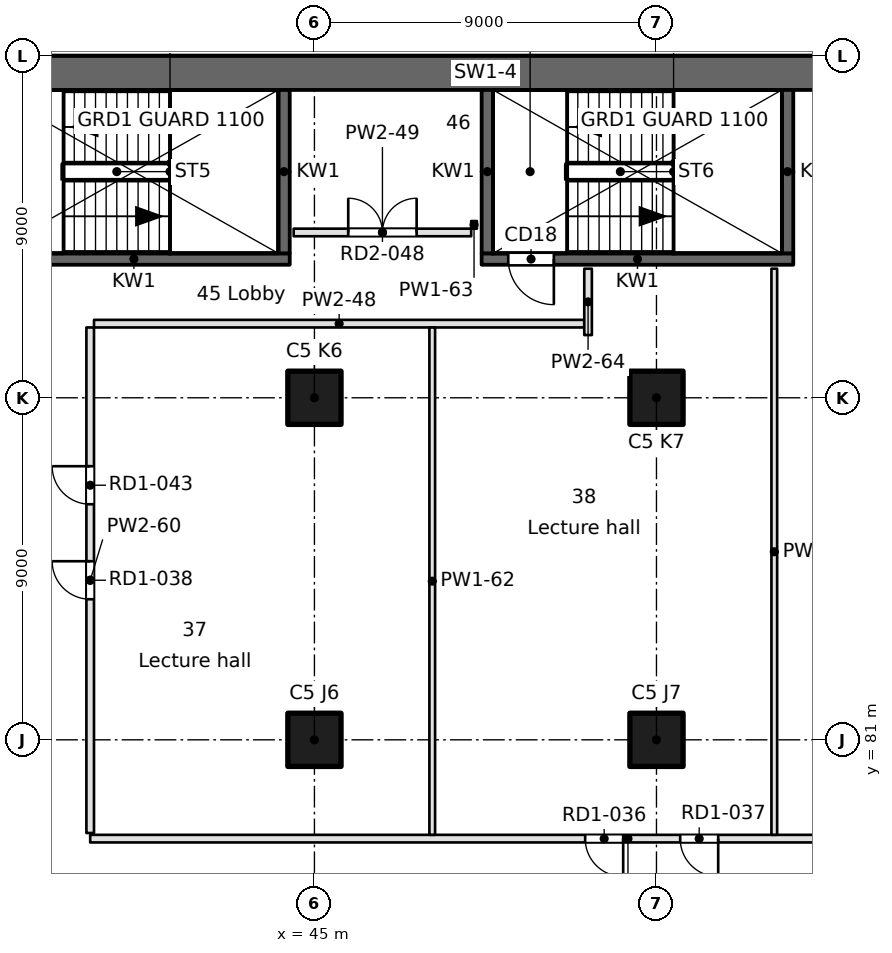
"""IFC4 building model, lengths in metres.
Left out: names, types, materials, properties, quantities, classifications, styles, units other than length and angle.
Written with IfcOpenShell. Run it as: python <this file> out.ifc"""

import sys

from ifc_helpers import new_model, si_unit, direction, frame, frame_2d, origin, origin_2d, place, context, subcontext, project, spatial, rectangle, extrude, element, fill, save


model = new_model("IFC4")
c1 = context("Model", 3, precision=1e-05, world=origin(), true_north=direction((0.0, 1.0)))
c2 = subcontext(c1, "Body", "Model", "MODEL_VIEW")
j1 = project(units=[si_unit("LENGTHUNIT", "METRE"), si_unit("PLANEANGLEUNIT", "RADIAN")], contexts=[c1])
p1 = place(None, origin())
s1 = spatial("IfcSite", under=j1, at=p1, CompositionType="ELEMENT")
p2 = place(p1, origin())
s2 = spatial("IfcBuilding", under=s1, at=p2, CompositionType="ELEMENT")
p3 = place(p2, frame((0.0, 0.0, 65.4)))
s3 = spatial("IfcBuildingStorey", under=s2, at=p3, CompositionType="ELEMENT", Elevation=65.4)
for number, where, z_axis, x_axis in (
    (1, (45.0, 81.0, 0.0), (0.0, 0.0, 1.0), (1.0, 0.0, 0.0)),
    (2, (45.0, 90.0, 0.0), (0.0, 0.0, 1.0), (1.0, 0.0, 0.0)),
    (3, (54.0, 81.0, 0.0), (0.0, 0.0, 1.0), (1.0, 0.0, 0.0)),
    (4, (54.0, 90.0, 0.0), (0.0, 0.0, 1.0), (1.0, 0.0, 0.0)),
):
    element("IfcColumn", number, at=place(p3, frame(where, z_axis=z_axis, x_axis=x_axis)), inside=s3, PredefinedType="COLUMN", context=c2, shape_type="SweptSolid", body=[
        extrude(rectangle(XDim=1.4, YDim=1.4, at=origin_2d()), origin(), (0.0, 0.0, 1.0), 3.7),
    ])
p4 = place(p3, frame((94.5, 98.55, 0.0), z_axis=(0.0, 0.0, 1.0), x_axis=(-1.0, 0.0, 0.0)))
e5 = element("IfcWall", 5, at=p4, inside=s3, PredefinedType="SHEAR", context=c2, shape_type="SweptSolid", body=[
    extrude(rectangle(XDim=90.0, YDim=0.9, at=frame_2d((45.0, 0.0))), origin(), (0.0, 0.0, 1.0), 3.7),
])
p5 = place(p3, frame((36.15, 93.65, -0.4), z_axis=(0.0, 0.0, 1.0), x_axis=(1.0, 0.0, 0.0)))
e6 = element("IfcWall", 6, at=p5, inside=s3, PredefinedType="SOLIDWALL", context=c2, shape_type="SweptSolid", body=[
    extrude(rectangle(XDim=8.2, YDim=0.3, at=frame_2d((4.1, 0.0))), origin(), (0.0, 0.0, 1.0), 3.7),
])
p6 = place(p5, frame((0.7, 0.0, 0.4)))
e7 = element("IfcOpeningElement", 7, at=p6, cuts=e6, PredefinedType="OPENING", context=c2, shape_type="SweptSolid", body=[
    extrude(rectangle(XDim=1.2, YDim=2.1, at=frame_2d((0.6, 1.05))), frame((0.0, 0.15, 0.0), z_axis=(0.0, -1.0, 0.0), x_axis=(1.0, 0.0, 0.0)), (0.0, 0.0, 1.0), 0.3),
])
p7 = place(p3, frame((49.4, 93.65, -0.4), z_axis=(0.0, 0.0, 1.0), x_axis=(1.0, 0.0, 0.0)))
e8 = element("IfcWall", 8, at=p7, inside=s3, PredefinedType="SOLIDWALL", context=c2, shape_type="SweptSolid", body=[
    extrude(rectangle(XDim=8.2, YDim=0.3, at=frame_2d((4.1, 0.0))), origin(), (0.0, 0.0, 1.0), 3.7),
])
p8 = place(p7, frame((0.7, 0.0, 0.4)))
e9 = element("IfcOpeningElement", 9, at=p8, cuts=e8, PredefinedType="OPENING", context=c2, shape_type="SweptSolid", body=[
    extrude(rectangle(XDim=1.2, YDim=2.1, at=frame_2d((0.6, 1.05))), frame((0.0, 0.15, 0.0), z_axis=(0.0, -1.0, 0.0), x_axis=(1.0, 0.0, 0.0)), (0.0, 0.0, 1.0), 0.3),
])
for number, where, z_axis, x_axis in (
    (10, (44.2, 93.8, -0.4), (0.0, 0.0, 1.0), (0.0, 1.0, 0.0)),
    (11, (49.55, 93.8, -0.4), (0.0, 0.0, 1.0), (0.0, 1.0, 0.0)),
    (12, (57.45, 93.8, -0.4), (0.0, 0.0, 1.0), (0.0, 1.0, 0.0)),
):
    element("IfcWall", number, at=place(p3, frame(where, z_axis=z_axis, x_axis=x_axis)), inside=s3, PredefinedType="SOLIDWALL", context=c2, shape_type="SweptSolid", body=[
        extrude(rectangle(XDim=4.3, YDim=0.3, at=frame_2d((2.15, 0.0))), origin(), (0.0, 0.0, 1.0), 3.7),
    ])
p9 = place(p3, frame((39.1, 78.4, 0.0), z_axis=(0.0, 0.0, 1.0), x_axis=(1.0, 0.0, 0.0)))
e13 = element("IfcWall", 13, at=p9, inside=s3, PredefinedType="PARTITIONING", context=c2, shape_type="SweptSolid", body=[
    extrude(rectangle(XDim=28.3, YDim=0.2, at=frame_2d((14.15, 0.0))), origin(), (0.0, 0.0, 1.0), 3.3),
])
p10 = place(p9, frame((13.024, 0.0, 0.0)))
e14 = element("IfcOpeningElement", 14, at=p10, cuts=e13, PredefinedType="OPENING", context=c2, shape_type="SweptSolid", body=[
    extrude(rectangle(XDim=1.0, YDim=2.1, at=frame_2d((0.5, 1.05))), frame((0.0, 0.1, 0.0), z_axis=(0.0, -1.0, 0.0), x_axis=(1.0, 0.0, 0.0)), (0.0, 0.0, 1.0), 0.2),
])
p11 = place(p9, frame((15.524, 0.0, 0.0)))
e15 = element("IfcOpeningElement", 15, at=p11, cuts=e13, PredefinedType="OPENING", context=c2, shape_type="SweptSolid", body=[
    extrude(rectangle(XDim=1.0, YDim=2.1, at=frame_2d((0.5, 1.05))), frame((0.0, 0.1, 0.0), z_axis=(0.0, -1.0, 0.0), x_axis=(1.0, 0.0, 0.0)), (0.0, 0.0, 1.0), 0.2),
])
p12 = place(p3, frame((52.1, 91.95, 0.0), z_axis=(0.0, 0.0, 1.0), x_axis=(-1.0, 0.0, 0.0)))
e16 = element("IfcWall", 16, at=p12, inside=s3, PredefinedType="PARTITIONING", context=c2, shape_type="SweptSolid", body=[
    extrude(rectangle(XDim=12.9, YDim=0.2, at=frame_2d((6.45, 0.0))), origin(), (0.0, 0.0, 1.0), 3.3),
])
p13 = place(p3, frame((44.454, 94.35, 0.0), z_axis=(0.0, 0.0, 1.0), x_axis=(1.0, 0.0, 0.0)))
e17 = element("IfcWall", 17, at=p13, inside=s3, PredefinedType="PARTITIONING", context=c2, shape_type="SweptSolid", body=[
    extrude(rectangle(XDim=4.671, YDim=0.2, at=frame_2d((2.335, 0.0))), origin(), (0.0, 0.0, 1.0), 3.3),
])
p14 = place(p13, frame((1.436, 0.0, 0.0)))
e18 = element("IfcOpeningElement", 18, at=p14, cuts=e17, PredefinedType="OPENING", context=c2, shape_type="SweptSolid", body=[
    extrude(rectangle(XDim=1.8, YDim=2.1, at=frame_2d((0.9, 1.05))), frame((0.0, 0.1, 0.0), z_axis=(0.0, -1.0, 0.0), x_axis=(1.0, 0.0, 0.0)), (0.0, 0.0, 1.0), 0.2),
])
p15 = place(p3, frame((39.1, 91.85, 0.0), z_axis=(0.0, 0.0, 1.0), x_axis=(0.0, -1.0, 0.0)))
e19 = element("IfcWall", 19, at=p15, inside=s3, PredefinedType="PARTITIONING", context=c2, shape_type="SweptSolid", body=[
    extrude(rectangle(XDim=13.302, YDim=0.2, at=frame_2d((6.651, 0.0))), origin(), (0.0, 0.0, 1.0), 3.3),
])
p16 = place(p15, frame((6.151, 0.0, 0.0)))
e20 = element("IfcOpeningElement", 20, at=p16, cuts=e19, PredefinedType="OPENING", context=c2, shape_type="SweptSolid", body=[
    extrude(rectangle(XDim=1.0, YDim=2.1, at=frame_2d((0.5, 1.05))), frame((0.0, 0.1, 0.0), z_axis=(0.0, -1.0, 0.0), x_axis=(1.0, 0.0, 0.0)), (0.0, 0.0, 1.0), 0.2),
])
p17 = place(p15, frame((3.651, 0.0, 0.0)))
e21 = element("IfcOpeningElement", 21, at=p17, cuts=e19, PredefinedType="OPENING", context=c2, shape_type="SweptSolid", body=[
    extrude(rectangle(XDim=1.0, YDim=2.1, at=frame_2d((0.5, 1.05))), frame((0.0, 0.1, 0.0), z_axis=(0.0, -1.0, 0.0), x_axis=(1.0, 0.0, 0.0)), (0.0, 0.0, 1.0), 0.2),
])
p18 = place(p3, frame((48.1, 91.85, 0.0), z_axis=(0.0, 0.0, 1.0), x_axis=(0.0, -1.0, 0.0)))
e22 = element("IfcWall", 22, at=p18, inside=s3, PredefinedType="PARTITIONING", context=c2, shape_type="SweptSolid", body=[
    extrude(rectangle(XDim=13.35, YDim=0.15, at=frame_2d((6.675, 0.0))), origin(), (0.0, 0.0, 1.0), 3.3),
])
p19 = place(p3, frame((49.2, 94.65, 0.0), z_axis=(0.0, 0.0, 1.0), x_axis=(0.0, -1.0, 0.0)))
e23 = element("IfcWall", 23, at=p19, inside=s3, PredefinedType="PARTITIONING", context=c2, shape_type="SweptSolid", body=[
    extrude(rectangle(XDim=0.2, YDim=0.15, at=frame_2d((0.1, 0.0))), origin(), (0.0, 0.0, 1.0), 3.3),
])
p20 = place(p3, frame((52.2, 93.396, 0.0), z_axis=(0.0, 0.0, 1.0), x_axis=(0.0, -1.0, 0.0)))
e24 = element("IfcWall", 24, at=p20, inside=s3, PredefinedType="PARTITIONING", context=c2, shape_type="SweptSolid", body=[
    extrude(rectangle(XDim=1.746, YDim=0.2, at=frame_2d((0.873, 0.0))), origin(), (0.0, 0.0, 1.0), 3.3),
])
p21 = place(p3, frame((57.1, 93.396, 0.0), z_axis=(0.0, 0.0, 1.0), x_axis=(0.0, -1.0, 0.0)))
e25 = element("IfcWall", 25, at=p21, inside=s3, PredefinedType="PARTITIONING", context=c2, shape_type="SweptSolid", body=[
    extrude(rectangle(XDim=14.896, YDim=0.15, at=frame_2d((7.448, 0.0))), origin(), (0.0, 0.0, 1.0), 3.3),
])
p22 = place(p8, frame((1.2, 0.0, 0.0), z_axis=(0.0, 0.0, 1.0), x_axis=(-1.0, 0.0, 0.0)))
e26 = element("IfcDoor", 26, at=p22, inside=s3, OperationType="SINGLE_SWING_LEFT", PredefinedType="DOOR", context=c2, shape_type="SweptSolid", body=[
    extrude(rectangle(XDim=1.2, YDim=2.1, at=frame_2d((0.6, 1.05))), frame((0.0, 0.025, 0.0), z_axis=(0.0, -1.0, 0.0), x_axis=(1.0, 0.0, 0.0)), (0.0, 0.0, 1.0), 0.05),
])
fill(e9, e26)
p23 = place(p10, frame((1.0, 0.0, 0.0), z_axis=(0.0, 0.0, 1.0), x_axis=(-1.0, 0.0, 0.0)))
e27 = element("IfcDoor", 27, at=p23, inside=s3, OperationType="SINGLE_SWING_LEFT", PredefinedType="DOOR", context=c2, shape_type="SweptSolid", body=[
    extrude(rectangle(XDim=1.0, YDim=2.1, at=frame_2d((0.5, 1.05))), frame((0.0, 0.025, 0.0), z_axis=(0.0, -1.0, 0.0), x_axis=(1.0, 0.0, 0.0)), (0.0, 0.0, 1.0), 0.05),
])
fill(e14, e27)
p24 = place(p11, frame((1.0, 0.0, 0.0), z_axis=(0.0, 0.0, 1.0), x_axis=(-1.0, 0.0, 0.0)))
e28 = element("IfcDoor", 28, at=p24, inside=s3, OperationType="SINGLE_SWING_LEFT", PredefinedType="DOOR", context=c2, shape_type="SweptSolid", body=[
    extrude(rectangle(XDim=1.0, YDim=2.1, at=frame_2d((0.5, 1.05))), frame((0.0, 0.025, 0.0), z_axis=(0.0, -1.0, 0.0), x_axis=(1.0, 0.0, 0.0)), (0.0, 0.0, 1.0), 0.05),
])
fill(e15, e28)
p25 = place(p16, frame((1.0, 0.0, 0.0), z_axis=(0.0, 0.0, 1.0), x_axis=(-1.0, 0.0, 0.0)))
e29 = element("IfcDoor", 29, at=p25, inside=s3, OperationType="SINGLE_SWING_RIGHT", PredefinedType="DOOR", context=c2, shape_type="SweptSolid", body=[
    extrude(rectangle(XDim=1.0, YDim=2.1, at=frame_2d((0.5, 1.05))), frame((0.0, 0.025, 0.0), z_axis=(0.0, -1.0, 0.0), x_axis=(1.0, 0.0, 0.0)), (0.0, 0.0, 1.0), 0.05),
])
fill(e20, e29)
p26 = place(p17, frame((1.0, 0.0, 0.0), z_axis=(0.0, 0.0, 1.0), x_axis=(-1.0, 0.0, 0.0)))
e30 = element("IfcDoor", 30, at=p26, inside=s3, OperationType="SINGLE_SWING_RIGHT", PredefinedType="DOOR", context=c2, shape_type="SweptSolid", body=[
    extrude(rectangle(XDim=1.0, YDim=2.1, at=frame_2d((0.5, 1.05))), frame((0.0, 0.025, 0.0), z_axis=(0.0, -1.0, 0.0), x_axis=(1.0, 0.0, 0.0)), (0.0, 0.0, 1.0), 0.05),
])
fill(e21, e30)
p27 = place(p14, origin())
e31 = element("IfcDoor", 31, at=p27, inside=s3, OperationType="DOUBLE_DOOR_SINGLE_SWING", PredefinedType="DOOR", context=c2, shape_type="SweptSolid", body=[
    extrude(rectangle(XDim=1.8, YDim=2.1, at=frame_2d((0.9, 1.05))), frame((0.0, 0.025, 0.0), z_axis=(0.0, -1.0, 0.0), x_axis=(1.0, 0.0, 0.0)), (0.0, 0.0, 1.0), 0.05),
])
fill(e18, e31)
save(model, sys.argv[1])
